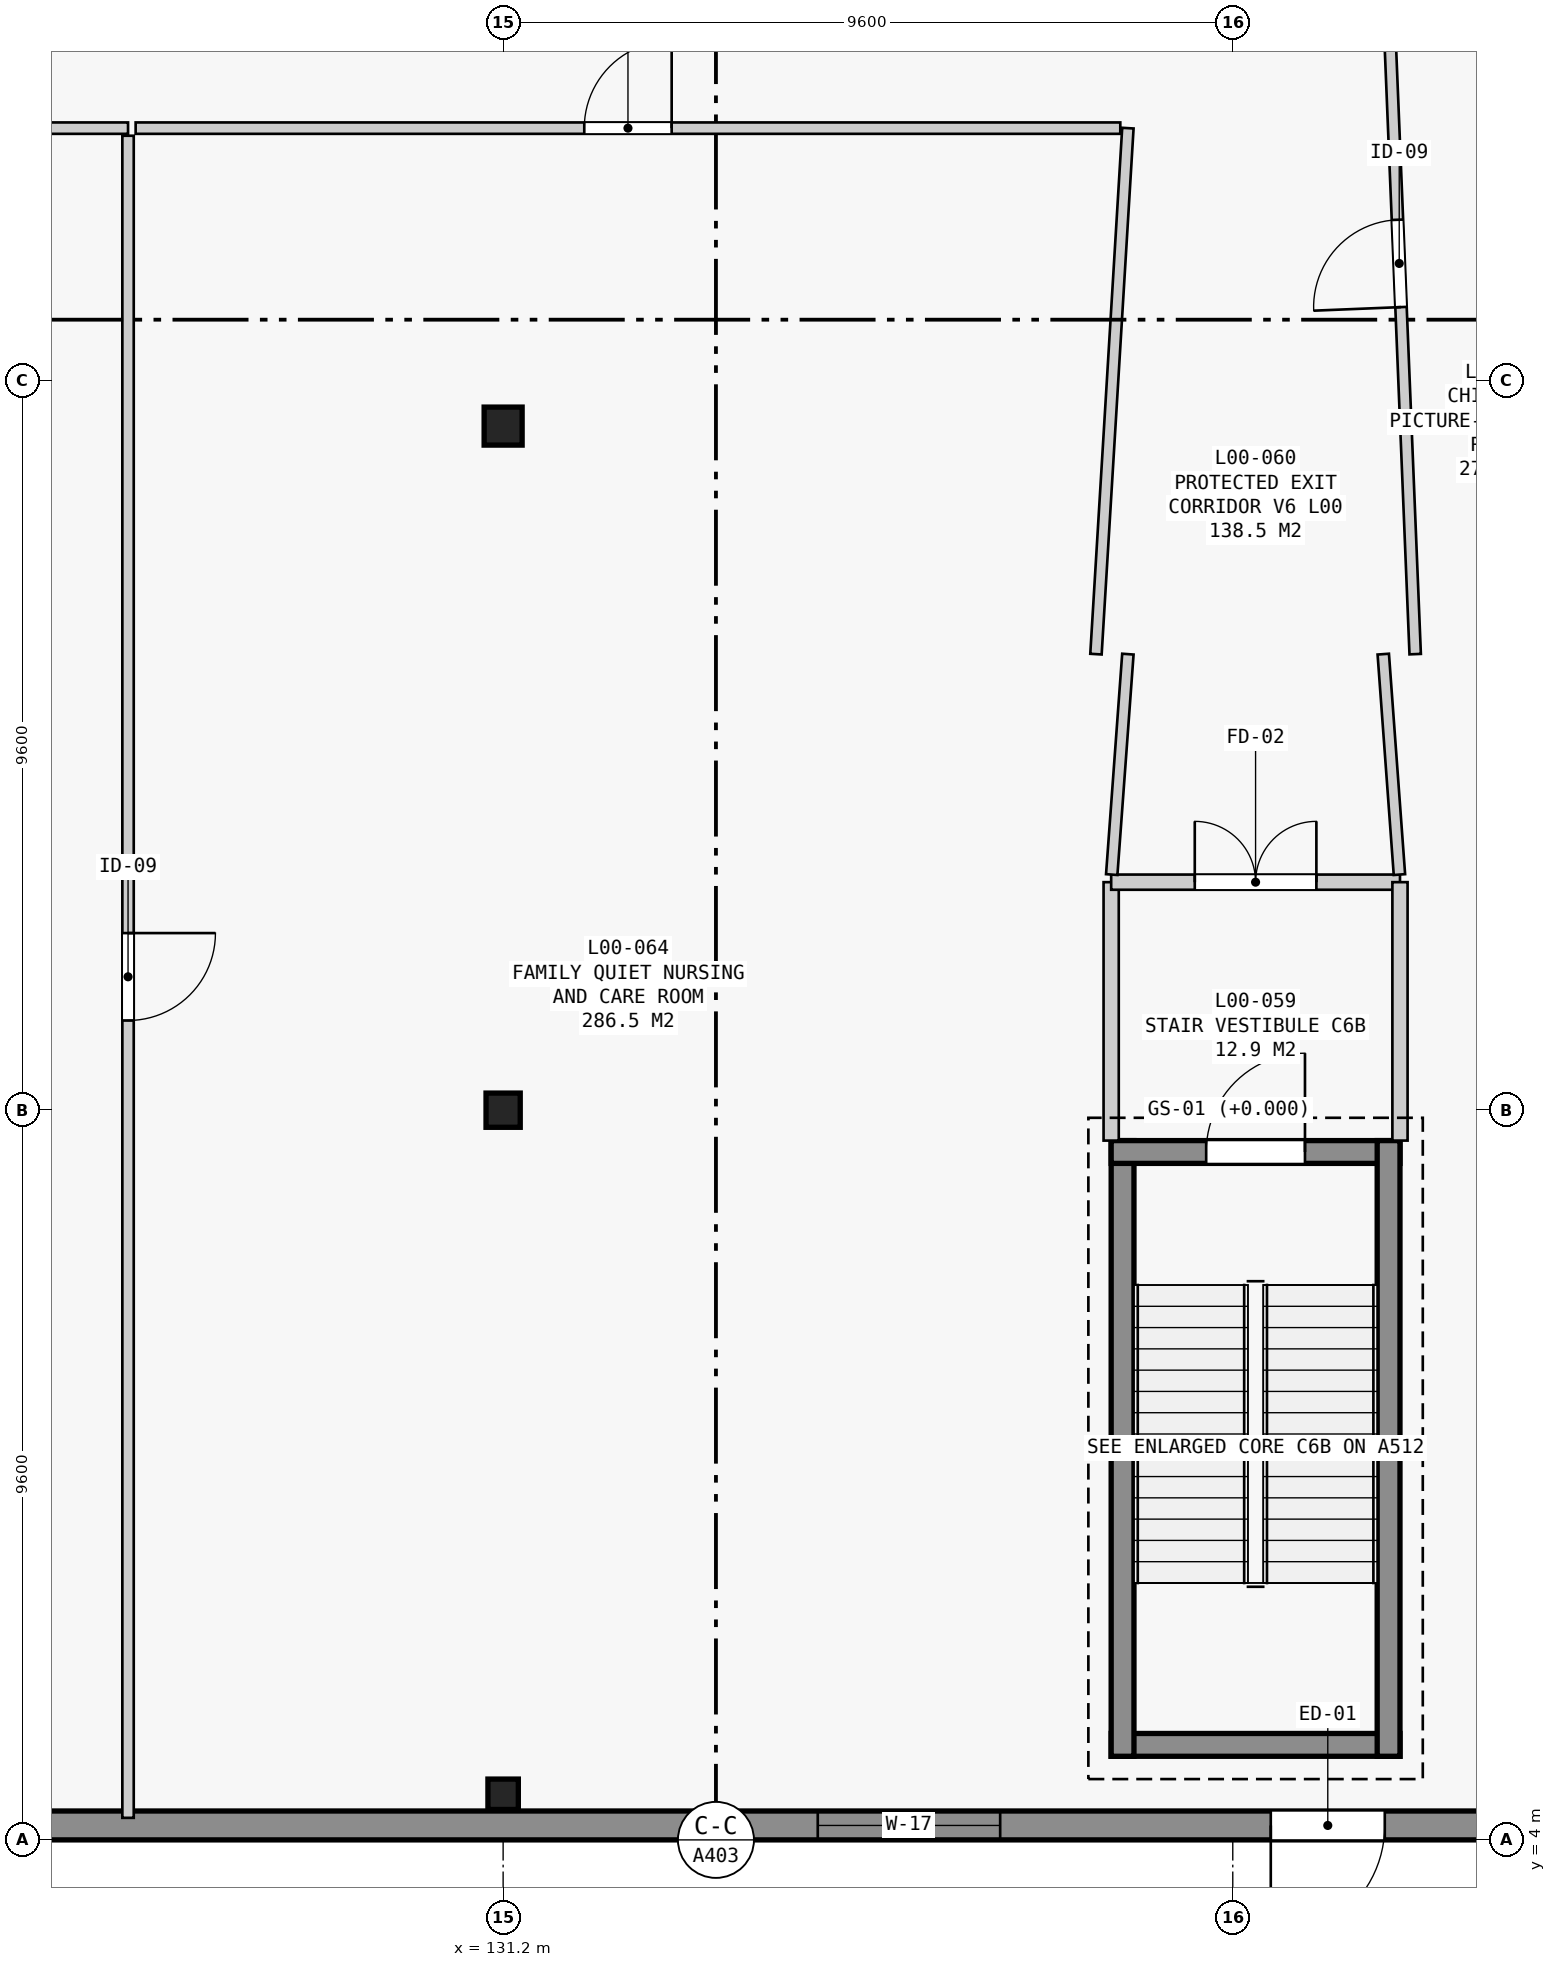
"""IFC4 building model, lengths in metres.
Left out: names, types, materials, properties, quantities, classifications, styles, units other than length and angle.
Written with IfcOpenShell. Run it as: python <this file> out.ifc"""

import sys

from ifc_helpers import new_model, si_unit, direction, frame, frame_2d, origin, origin_2d, place, context, subcontext, project, spatial, rectangle, extrude, element, fill, save


model = new_model("IFC4")
c1 = context("Model", 3, precision=1e-05, world=origin(), true_north=direction((0.0, 1.0)))
c2 = subcontext(c1, "Body", "Model", "MODEL_VIEW")
j1 = project(units=[si_unit("LENGTHUNIT", "METRE"), si_unit("PLANEANGLEUNIT", "RADIAN")], contexts=[c1])
p1 = place(None, origin())
s1 = spatial("IfcSite", under=j1, at=p1, CompositionType="ELEMENT")
p2 = place(p1, origin())
s2 = spatial("IfcBuilding", under=s1, at=p2, CompositionType="ELEMENT")
p3 = place(p2, origin())
s3 = spatial("IfcBuildingStorey", under=s2, at=p3, CompositionType="ELEMENT", Elevation=0.0)
p4 = place(p3, frame((131.2, 4.6, 0.0), z_axis=(0.0, 0.0, 1.0), x_axis=(1.0, 0.0, 0.0)))
e1 = element("IfcColumn", 1, at=p4, inside=s3, PredefinedType="COLUMN", context=c2, shape_type="SweptSolid", body=[
    extrude(rectangle(XDim=0.4, YDim=0.4, at=origin_2d()), origin(), (0.0, 0.0, 1.0), 5.4),
])
p5 = place(p3, frame((131.2, 13.6, 0.0), z_axis=(0.0, 0.0, 1.0), x_axis=(1.0, 0.0, 0.0)))
e2 = element("IfcColumn", 2, at=p5, inside=s3, PredefinedType="COLUMN", context=c2, shape_type="SweptSolid", body=[
    extrude(rectangle(XDim=0.45, YDim=0.45, at=origin_2d()), origin(), (0.0, 0.0, 1.0), 5.4),
])
p6 = place(p3, frame((131.2, 22.6, 0.0), z_axis=(0.0, 0.0, 1.0), x_axis=(1.0, 0.0, 0.0)))
e3 = element("IfcColumn", 3, at=p6, inside=s3, PredefinedType="COLUMN", context=c2, shape_type="SweptSolid", body=[
    extrude(rectangle(XDim=0.5, YDim=0.5, at=origin_2d()), origin(), (0.0, 0.0, 1.0), 5.4),
])
p7 = place(p3, frame((167.81, 4.19, 0.0), z_axis=(0.0, 0.0, 1.0), x_axis=(-1.0, 0.0, 0.0)))
e4 = element("IfcWall", 4, at=p7, inside=s3, PredefinedType="STANDARD", context=c2, shape_type="SweptSolid", body=[
    extrude(rectangle(XDim=55.52, YDim=0.38, at=frame_2d((27.76, 0.0))), origin(), (0.0, 0.0, 1.0), 5.14),
])
p8 = place(p7, frame((25.01, 0.0, 0.0)))
e5 = element("IfcOpeningElement", 5, at=p8, cuts=e4, PredefinedType="OPENING", context=c2, shape_type="SweptSolid", body=[
    extrude(rectangle(XDim=1.5, YDim=2.3, at=frame_2d((0.75, 1.15))), frame((0.0, 0.2, 0.0), z_axis=(0.0, -1.0, 0.0), x_axis=(1.0, 0.0, 0.0)), (0.0, 0.0, 1.0), 0.4),
])
p9 = place(p7, frame((30.07, 0.0, 1.65)))
e6 = element("IfcOpeningElement", 6, at=p9, cuts=e4, PredefinedType="OPENING", context=c2, shape_type="SweptSolid", body=[
    extrude(rectangle(XDim=2.4, YDim=1.8, at=frame_2d((1.2, 0.9))), frame((0.0, 0.2, 0.0), z_axis=(0.0, -1.0, 0.0), x_axis=(1.0, 0.0, 0.0)), (0.0, 0.0, 1.0), 0.4),
])
p10 = place(p7, frame((20.36, 0.0, 0.0)))
e7 = element("IfcOpeningElement", 7, at=p10, cuts=e4, PredefinedType="OPENING", context=c2, shape_type="SweptSolid", body=[
    extrude(rectangle(XDim=1.5, YDim=2.3, at=frame_2d((0.75, 1.15))), frame((0.0, 0.2, 0.0), z_axis=(0.0, -1.0, 0.0), x_axis=(1.0, 0.0, 0.0)), (0.0, 0.0, 1.0), 0.4),
])
p11 = place(p3, frame((143.0, 5.25, 0.0), z_axis=(0.0, 0.0, 1.0), x_axis=(-1.0, 0.0, 0.0)))
e8 = element("IfcWall", 8, at=p11, inside=s3, PredefinedType="SHEAR", context=c2, shape_type="SweptSolid", body=[
    extrude(rectangle(XDim=3.8, YDim=0.3, at=frame_2d((1.9, 0.0))), origin(), (0.0, 0.0, 1.0), 5.14),
])
p12 = place(p3, frame((139.35, 5.1, 0.0), z_axis=(0.0, 0.0, 1.0), x_axis=(0.0, 1.0, 0.0)))
e9 = element("IfcWall", 9, at=p12, inside=s3, PredefinedType="SHEAR", context=c2, shape_type="SweptSolid", body=[
    extrude(rectangle(XDim=8.1, YDim=0.3, at=frame_2d((4.05, 0.0))), origin(), (0.0, 0.0, 1.0), 5.14),
])
p13 = place(p3, frame((139.2, 13.05, 0.0), z_axis=(0.0, 0.0, 1.0), x_axis=(1.0, 0.0, 0.0)))
e10 = element("IfcWall", 10, at=p13, inside=s3, PredefinedType="SHEAR", context=c2, shape_type="SweptSolid", body=[
    extrude(rectangle(XDim=3.8, YDim=0.3, at=frame_2d((1.9, 0.0))), origin(), (0.0, 0.0, 1.0), 5.14),
])
p14 = place(p13, frame((1.25, 0.0, 0.0)))
e11 = element("IfcOpeningElement", 11, at=p14, cuts=e10, PredefinedType="OPENING", context=c2, shape_type="SweptSolid", body=[
    extrude(rectangle(XDim=1.3, YDim=2.2, at=frame_2d((0.65, 1.1))), frame((0.0, 0.16, 0.0), z_axis=(0.0, -1.0, 0.0), x_axis=(1.0, 0.0, 0.0)), (0.0, 0.0, 1.0), 0.32),
])
p15 = place(p3, frame((142.85, 13.2, 0.0), z_axis=(0.0, 0.0, 1.0), x_axis=(0.0, -1.0, 0.0)))
e12 = element("IfcWall", 12, at=p15, inside=s3, PredefinedType="SHEAR", context=c2, shape_type="SweptSolid", body=[
    extrude(rectangle(XDim=8.1, YDim=0.3, at=frame_2d((4.05, 0.0))), origin(), (0.0, 0.0, 1.0), 5.14),
])
p16 = place(p3, frame((139.2, 13.2, 0.0), z_axis=(0.0, 0.0, 1.0), x_axis=(0.0, 1.0, 0.0)))
e13 = element("IfcWall", 13, at=p16, inside=s3, PredefinedType="STANDARD", context=c2, shape_type="SweptSolid", body=[
    extrude(rectangle(XDim=3.4, YDim=0.2, at=frame_2d((1.7, 0.0))), origin(), (0.0, 0.0, 1.0), 4.37),
])
p17 = place(p3, frame((139.2, 16.6, 0.0), z_axis=(0.0, 0.0, 1.0), x_axis=(1.0, 0.0, 0.0)))
e14 = element("IfcWall", 14, at=p17, inside=s3, PredefinedType="STANDARD", context=c2, shape_type="SweptSolid", body=[
    extrude(rectangle(XDim=3.8, YDim=0.2, at=frame_2d((1.9, 0.0))), origin(), (0.0, 0.0, 1.0), 5.14),
])
p18 = place(p17, frame((1.1, 0.0, 0.0)))
e15 = element("IfcOpeningElement", 15, at=p18, cuts=e14, PredefinedType="OPENING", context=c2, shape_type="SweptSolid", body=[
    extrude(rectangle(XDim=1.6, YDim=2.2, at=frame_2d((0.8, 1.1))), frame((0.0, 0.11, 0.0), z_axis=(0.0, -1.0, 0.0), x_axis=(1.0, 0.0, 0.0)), (0.0, 0.0, 1.0), 0.22),
])
p19 = place(p3, frame((143.0, 16.6, 0.0), z_axis=(0.0, 0.0, 1.0), x_axis=(0.0, -1.0, 0.0)))
e16 = element("IfcWall", 16, at=p19, inside=s3, PredefinedType="STANDARD", context=c2, shape_type="SweptSolid", body=[
    extrude(rectangle(XDim=3.4, YDim=0.2, at=frame_2d((1.7, 0.0))), origin(), (0.0, 0.0, 1.0), 4.37),
])
p20 = place(p3, frame((115.2, 26.52, 0.0), z_axis=(0.0, 0.0, 1.0), x_axis=(1.0, 0.0, 0.0)))
e17 = element("IfcWall", 17, at=p20, inside=s3, PredefinedType="PARTITIONING", context=c2, shape_type="SweptSolid", body=[
    extrude(rectangle(XDim=11.065, YDim=0.15, at=frame_2d((5.532, 0.0))), origin(), (0.0, 0.0, 1.0), 4.37),
])
p21 = place(p3, frame((126.265, 26.42, 0.0), z_axis=(0.0, 0.0, 1.0), x_axis=(0.0, -1.0, 0.0)))
e18 = element("IfcWall", 18, at=p21, inside=s3, PredefinedType="PARTITIONING", context=c2, shape_type="SweptSolid", body=[
    extrude(rectangle(XDim=22.13, YDim=0.15, at=frame_2d((11.065, 0.0))), origin(), (0.0, 0.0, 1.0), 4.32),
])
p22 = place(p21, frame((10.49, 0.0, 0.0)))
e19 = element("IfcOpeningElement", 19, at=p22, cuts=e18, PredefinedType="OPENING", context=c2, shape_type="SweptSolid", body=[
    extrude(rectangle(XDim=1.15, YDim=2.2, at=frame_2d((0.575, 1.1))), frame((0.0, 0.085, 0.0), z_axis=(0.0, -1.0, 0.0), x_axis=(1.0, 0.0, 0.0)), (0.0, 0.0, 1.0), 0.17),
])
p23 = place(p3, frame((139.42, 26.52, 0.0), z_axis=(0.0, 0.0, 1.0), x_axis=(-0.060571614063, -0.998163854069, 0.0)))
e20 = element("IfcWall", 20, at=p23, inside=s3, PredefinedType="PARTITIONING", context=c2, shape_type="SweptSolid", body=[
    extrude(rectangle(XDim=6.933, YDim=0.15, at=frame_2d((3.466, 0.0))), origin(), (0.0, 0.0, 1.0), 4.32),
])
p24 = place(p3, frame((139.42, 19.6, 0.0), z_axis=(0.0, 0.0, 1.0), x_axis=(-0.073120239762, -0.997323132459, 0.0)))
e21 = element("IfcWall", 21, at=p24, inside=s3, PredefinedType="PARTITIONING", context=c2, shape_type="SweptSolid", body=[
    extrude(rectangle(XDim=2.908, YDim=0.15, at=frame_2d((1.454, 0.0))), origin(), (0.0, 0.0, 1.0), 5.14),
])
p25 = place(p3, frame((126.365, 26.52, 0.0), z_axis=(0.0, 0.0, 1.0), x_axis=(1.0, 0.0, 0.0)))
e22 = element("IfcWall", 22, at=p25, inside=s3, PredefinedType="PARTITIONING", context=c2, shape_type="SweptSolid", body=[
    extrude(rectangle(XDim=12.955, YDim=0.15, at=frame_2d((6.478, 0.0))), origin(), (0.0, 0.0, 1.0), 4.37),
])
p26 = place(p25, frame((5.903, 0.0, 0.0)))
e23 = element("IfcOpeningElement", 23, at=p26, cuts=e22, PredefinedType="OPENING", context=c2, shape_type="SweptSolid", body=[
    extrude(rectangle(XDim=1.15, YDim=2.2, at=frame_2d((0.575, 1.1))), frame((0.0, 0.085, 0.0), z_axis=(0.0, -1.0, 0.0), x_axis=(1.0, 0.0, 0.0)), (0.0, 0.0, 1.0), 0.17),
])
p27 = place(p3, frame((142.993, 16.7, 0.0), z_axis=(0.0, 0.0, 1.0), x_axis=(-0.073120239762, 0.997323132459, 0.0)))
e24 = element("IfcWall", 24, at=p27, inside=s3, PredefinedType="PARTITIONING", context=c2, shape_type="SweptSolid", body=[
    extrude(rectangle(XDim=2.908, YDim=0.15, at=frame_2d((1.454, 0.0))), origin(), (0.0, 0.0, 1.0), 5.14),
])
p28 = place(p3, frame((143.2, 19.6, 0.0), z_axis=(0.0, 0.0, 1.0), x_axis=(-0.040815245864, 0.999166710667, 0.0)))
e25 = element("IfcWall", 25, at=p28, inside=s3, PredefinedType="PARTITIONING", context=c2, shape_type="SweptSolid", body=[
    extrude(rectangle(XDim=10.288, YDim=0.15, at=frame_2d((5.144, 0.0))), origin(), (0.0, 0.0, 1.0), 4.32),
])
p29 = place(p28, frame((4.569, 0.0, 0.0)))
e26 = element("IfcOpeningElement", 26, at=p29, cuts=e25, PredefinedType="OPENING", context=c2, shape_type="SweptSolid", body=[
    extrude(rectangle(XDim=1.15, YDim=2.2, at=frame_2d((0.575, 1.1))), frame((0.0, 0.085, 0.0), z_axis=(0.0, -1.0, 0.0), x_axis=(1.0, 0.0, 0.0)), (0.0, 0.0, 1.0), 0.17),
])
p30 = place(p8, origin())
e27 = element("IfcDoor", 27, at=p30, inside=s3, OperationType="SINGLE_SWING_RIGHT", PredefinedType="DOOR", context=c2, shape_type="SweptSolid", body=[
    extrude(rectangle(XDim=1.5, YDim=2.3, at=frame_2d((0.75, 1.15))), frame((0.0, 0.025, 0.0), z_axis=(0.0, -1.0, 0.0), x_axis=(1.0, 0.0, 0.0)), (0.0, 0.0, 1.0), 0.05),
])
fill(e5, e27)
p31 = place(p9, origin())
e28 = element("IfcWindow", 28, at=p31, inside=s3, PartitioningType="SINGLE_PANEL", PredefinedType="WINDOW", context=c2, shape_type="SweptSolid", body=[
    extrude(rectangle(XDim=2.4, YDim=1.8, at=frame_2d((1.2, 0.9))), frame((0.0, 0.03, 0.0), z_axis=(0.0, -1.0, 0.0), x_axis=(1.0, 0.0, 0.0)), (0.0, 0.0, 1.0), 0.06),
])
fill(e6, e28)
p32 = place(p14, origin())
e29 = element("IfcDoor", 29, at=p32, inside=s3, OperationType="SINGLE_SWING_RIGHT", PredefinedType="DOOR", context=c2, shape_type="SweptSolid", body=[
    extrude(rectangle(XDim=1.3, YDim=2.2, at=frame_2d((0.65, 1.1))), frame((0.0, 0.025, 0.0), z_axis=(0.0, -1.0, 0.0), x_axis=(1.0, 0.0, 0.0)), (0.0, 0.0, 1.0), 0.05),
])
fill(e11, e29)
p33 = place(p18, origin())
e30 = element("IfcDoor", 30, at=p33, inside=s3, OperationType="DOUBLE_DOOR_SINGLE_SWING", PredefinedType="DOOR", context=c2, shape_type="SweptSolid", body=[
    extrude(rectangle(XDim=1.6, YDim=2.2, at=frame_2d((0.8, 1.1))), frame((0.0, 0.025, 0.0), z_axis=(0.0, -1.0, 0.0), x_axis=(1.0, 0.0, 0.0)), (0.0, 0.0, 1.0), 0.05),
])
fill(e15, e30)
p34 = place(p22, origin())
e31 = element("IfcDoor", 31, at=p34, inside=s3, OperationType="SINGLE_SWING_LEFT", PredefinedType="DOOR", context=c2, shape_type="SweptSolid", body=[
    extrude(rectangle(XDim=1.15, YDim=2.2, at=frame_2d((0.575, 1.1))), frame((0.0, 0.025, 0.0), z_axis=(0.0, -1.0, 0.0), x_axis=(1.0, 0.0, 0.0)), (0.0, 0.0, 1.0), 0.05),
])
fill(e19, e31)
p35 = place(p26, origin())
e32 = element("IfcDoor", 32, at=p35, inside=s3, OperationType="SINGLE_SWING_RIGHT", PredefinedType="DOOR", context=c2, shape_type="SweptSolid", body=[
    extrude(rectangle(XDim=1.15, YDim=2.2, at=frame_2d((0.575, 1.1))), frame((0.0, 0.025, 0.0), z_axis=(0.0, -1.0, 0.0), x_axis=(1.0, 0.0, 0.0)), (0.0, 0.0, 1.0), 0.05),
])
fill(e23, e32)
p36 = place(p29, origin())
e33 = element("IfcDoor", 33, at=p36, inside=s3, OperationType="SINGLE_SWING_LEFT", PredefinedType="DOOR", context=c2, shape_type="SweptSolid", body=[
    extrude(rectangle(XDim=1.15, YDim=2.2, at=frame_2d((0.575, 1.1))), frame((0.0, 0.025, 0.0), z_axis=(0.0, -1.0, 0.0), x_axis=(1.0, 0.0, 0.0)), (0.0, 0.0, 1.0), 0.05),
])
fill(e26, e33)
save(model, sys.argv[1])
